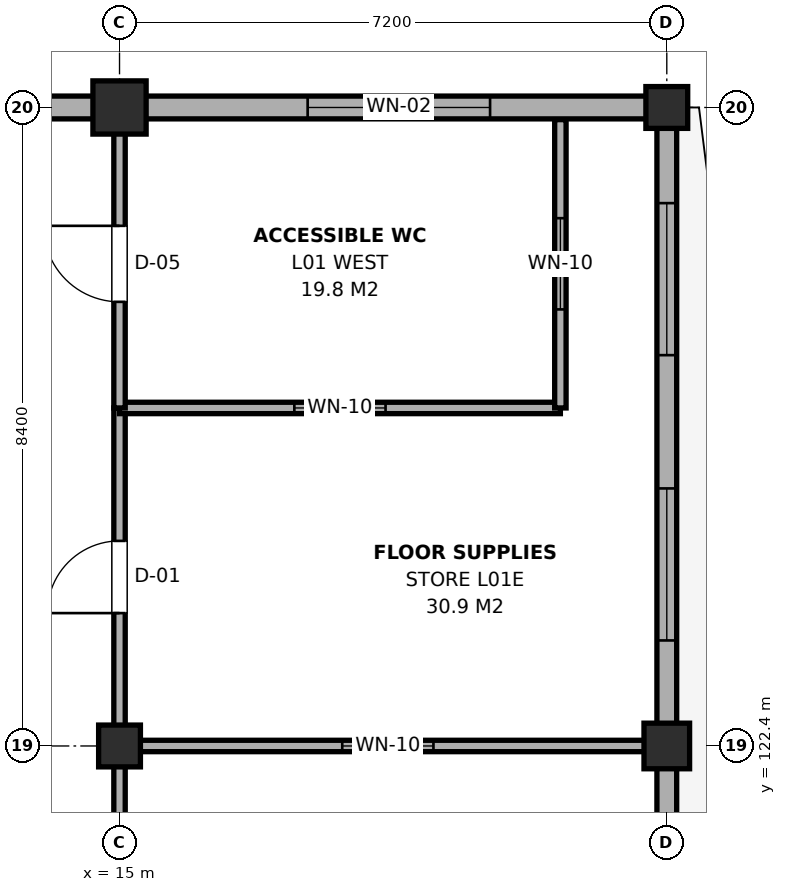
"""IFC4 building model, lengths in metres.
Left out: names, types, materials, properties, quantities, classifications, styles, units other than length and angle.
Written with IfcOpenShell. Run it as: python <this file> out.ifc"""

import sys

from ifc_helpers import new_model, si_unit, direction, frame, frame_2d, origin, origin_2d, place, context, subcontext, project, spatial, rectangle, extrude, element, fill, save


model = new_model("IFC4")
c1 = context("Model", 3, precision=1e-05, world=origin(), true_north=direction((0.0, 1.0)))
c2 = subcontext(c1, "Body", "Model", "MODEL_VIEW")
j1 = project(units=[si_unit("LENGTHUNIT", "METRE"), si_unit("PLANEANGLEUNIT", "RADIAN")], contexts=[c1])
p1 = place(None, origin())
s1 = spatial("IfcSite", under=j1, at=p1, CompositionType="ELEMENT")
p2 = place(p1, origin())
s2 = spatial("IfcBuilding", under=s1, at=p2, CompositionType="ELEMENT")
p3 = place(p2, frame((0.0, 0.0, 4.8)))
s3 = spatial("IfcBuildingStorey", under=s2, at=p3, CompositionType="ELEMENT", Elevation=4.8)
p4 = place(p3, frame((15.0, 122.4, 0.0), z_axis=(0.0, 0.0, 1.0), x_axis=(1.0, 0.0, 0.0)))
e1 = element("IfcColumn", 1, at=p4, inside=s3, PredefinedType="COLUMN", context=c2, shape_type="SweptSolid", body=[
    extrude(rectangle(XDim=0.55, YDim=0.55, at=origin_2d()), origin(), (0.0, 0.0, 1.0), 4.2),
])
p5 = place(p3, frame((15.0, 130.8, 0.0), z_axis=(0.0, 0.0, 1.0), x_axis=(1.0, 0.0, 0.0)))
e2 = element("IfcColumn", 2, at=p5, inside=s3, PredefinedType="COLUMN", context=c2, shape_type="SweptSolid", body=[
    extrude(rectangle(XDim=0.7, YDim=0.7, at=origin_2d()), origin(), (0.0, 0.0, 1.0), 4.2),
])
p6 = place(p3, frame((22.2, 122.4, 0.0), z_axis=(0.0, 0.0, 1.0), x_axis=(1.0, 0.0, 0.0)))
e3 = element("IfcColumn", 3, at=p6, inside=s3, PredefinedType="COLUMN", context=c2, shape_type="SweptSolid", body=[
    extrude(rectangle(XDim=0.6, YDim=0.6, at=origin_2d()), origin(), (0.0, 0.0, 1.0), 4.2),
])
p7 = place(p3, frame((22.2, 130.8, 0.0), z_axis=(0.0, 0.0, 1.0), x_axis=(1.0, 0.0, 0.0)))
e4 = element("IfcColumn", 4, at=p7, inside=s3, PredefinedType="COLUMN", context=c2, shape_type="SweptSolid", body=[
    extrude(rectangle(XDim=0.55, YDim=0.55, at=origin_2d()), origin(), (0.0, 0.0, 1.0), 4.2),
])
p8 = place(p3, frame((22.2, 113.4, 0.0), z_axis=(0.0, 0.0, 1.0), x_axis=(0.0, 1.0, 0.0)))
e5 = element("IfcWall", 5, at=p8, inside=s3, PredefinedType="SOLIDWALL", context=c2, shape_type="SweptSolid", body=[
    extrude(rectangle(XDim=9.0, YDim=0.26, at=frame_2d((4.5, 0.0))), origin(), (0.0, 0.0, 1.0), 3.585),
])
p9 = place(p8, frame((1.52, 0.0, 0.9)))
e6 = element("IfcOpeningElement", 6, at=p9, cuts=e5, PredefinedType="OPENING", context=c2, shape_type="SweptSolid", body=[
    extrude(rectangle(XDim=2.0, YDim=1.8, at=frame_2d((1.0, 0.9))), frame((0.0, 0.145, 0.0), z_axis=(0.0, -1.0, 0.0), x_axis=(1.0, 0.0, 0.0)), (0.0, 0.0, 1.0), 0.29),
])
p10 = place(p8, frame((5.48, 0.0, 0.9)))
e7 = element("IfcOpeningElement", 7, at=p10, cuts=e5, PredefinedType="OPENING", context=c2, shape_type="SweptSolid", body=[
    extrude(rectangle(XDim=2.0, YDim=1.8, at=frame_2d((1.0, 0.9))), frame((0.0, 0.145, 0.0), z_axis=(0.0, -1.0, 0.0), x_axis=(1.0, 0.0, 0.0)), (0.0, 0.0, 1.0), 0.29),
])
p11 = place(p3, frame((22.2, 122.4, 0.0), z_axis=(0.0, 0.0, 1.0), x_axis=(0.0, 1.0, 0.0)))
e8 = element("IfcWall", 8, at=p11, inside=s3, PredefinedType="SOLIDWALL", context=c2, shape_type="SweptSolid", body=[
    extrude(rectangle(XDim=8.53, YDim=0.26, at=frame_2d((4.265, 0.0))), origin(), (0.0, 0.0, 1.0), 3.585),
])
p12 = place(p11, frame((1.388, 0.0, 0.9)))
e9 = element("IfcOpeningElement", 9, at=p12, cuts=e8, PredefinedType="OPENING", context=c2, shape_type="SweptSolid", body=[
    extrude(rectangle(XDim=2.0, YDim=1.8, at=frame_2d((1.0, 0.9))), frame((0.0, 0.145, 0.0), z_axis=(0.0, -1.0, 0.0), x_axis=(1.0, 0.0, 0.0)), (0.0, 0.0, 1.0), 0.29),
])
p13 = place(p11, frame((5.142, 0.0, 0.9)))
e10 = element("IfcOpeningElement", 10, at=p13, cuts=e8, PredefinedType="OPENING", context=c2, shape_type="SweptSolid", body=[
    extrude(rectangle(XDim=2.0, YDim=1.8, at=frame_2d((1.0, 0.9))), frame((0.0, 0.145, 0.0), z_axis=(0.0, -1.0, 0.0), x_axis=(1.0, 0.0, 0.0)), (0.0, 0.0, 1.0), 0.29),
])
p14 = place(p3, frame((7.8, 130.8, 0.0), z_axis=(0.0, 0.0, 1.0), x_axis=(1.0, 0.0, 0.0)))
e11 = element("IfcWall", 11, at=p14, inside=s3, PredefinedType="SOLIDWALL", context=c2, shape_type="SweptSolid", body=[
    extrude(rectangle(XDim=7.2, YDim=0.3, at=frame_2d((3.6, 0.0))), origin(), (0.0, 0.0, 1.0), 3.475),
])
p15 = place(p14, frame((1.45, 0.0, 0.9)))
e12 = element("IfcOpeningElement", 12, at=p15, cuts=e11, PredefinedType="OPENING", context=c2, shape_type="SweptSolid", body=[
    extrude(rectangle(XDim=2.4, YDim=2.1, at=frame_2d((1.2, 1.05))), frame((0.0, 0.165, 0.0), z_axis=(0.0, -1.0, 0.0), x_axis=(1.0, 0.0, 0.0)), (0.0, 0.0, 1.0), 0.33),
])
p16 = place(p3, frame((15.0, 130.8, 0.0), z_axis=(0.0, 0.0, 1.0), x_axis=(1.0, 0.0, 0.0)))
e13 = element("IfcWall", 13, at=p16, inside=s3, PredefinedType="SOLIDWALL", context=c2, shape_type="SweptSolid", body=[
    extrude(rectangle(XDim=7.35, YDim=0.3, at=frame_2d((3.675, 0.0))), origin(), (0.0, 0.0, 1.0), 3.525),
])
p17 = place(p16, frame((2.475, 0.0, 0.9)))
e14 = element("IfcOpeningElement", 14, at=p17, cuts=e13, PredefinedType="OPENING", context=c2, shape_type="SweptSolid", body=[
    extrude(rectangle(XDim=2.4, YDim=2.1, at=frame_2d((1.2, 1.05))), frame((0.0, 0.165, 0.0), z_axis=(0.0, -1.0, 0.0), x_axis=(1.0, 0.0, 0.0)), (0.0, 0.0, 1.0), 0.33),
])
p18 = place(p3, frame((15.0, 104.4, 0.0), z_axis=(0.0, 0.0, 1.0), x_axis=(0.0, 1.0, 0.0)))
e15 = element("IfcWall", 15, at=p18, inside=s3, PredefinedType="PARTITIONING", context=c2, shape_type="SweptSolid", body=[
    extrude(rectangle(XDim=18.0, YDim=0.15, at=frame_2d((9.0, 0.0))), origin(), (0.0, 0.0, 1.0), 3.535),
])
p19 = place(p18, frame((9.375, 0.0, 0.0)))
e16 = element("IfcOpeningElement", 16, at=p19, cuts=e15, PredefinedType="OPENING", context=c2, shape_type="SweptSolid", body=[
    extrude(rectangle(XDim=1.05, YDim=2.15, at=frame_2d((0.525, 1.075))), frame((0.0, 0.09, 0.0), z_axis=(0.0, -1.0, 0.0), x_axis=(1.0, 0.0, 0.0)), (0.0, 0.0, 1.0), 0.18),
])
p20 = place(p18, frame((3.2, 0.0, 0.95)))
e17 = element("IfcOpeningElement", 17, at=p20, cuts=e15, PredefinedType="OPENING", context=c2, shape_type="SweptSolid", body=[
    extrude(rectangle(XDim=2.6, YDim=1.5, at=frame_2d((1.3, 0.75))), frame((0.0, 0.09, 0.0), z_axis=(0.0, -1.0, 0.0), x_axis=(1.0, 0.0, 0.0)), (0.0, 0.0, 1.0), 0.18),
])
p21 = place(p18, frame((12.2, 0.0, 0.95)))
e18 = element("IfcOpeningElement", 18, at=p21, cuts=e15, PredefinedType="OPENING", context=c2, shape_type="SweptSolid", body=[
    extrude(rectangle(XDim=2.6, YDim=1.5, at=frame_2d((1.3, 0.75))), frame((0.0, 0.09, 0.0), z_axis=(0.0, -1.0, 0.0), x_axis=(1.0, 0.0, 0.0)), (0.0, 0.0, 1.0), 0.18),
])
p22 = place(p3, frame((15.0, 122.4, 0.0), z_axis=(0.0, 0.0, 1.0), x_axis=(0.0, 1.0, 0.0)))
e19 = element("IfcWall", 19, at=p22, inside=s3, PredefinedType="PARTITIONING", context=c2, shape_type="SweptSolid", body=[
    extrude(rectangle(XDim=4.447, YDim=0.15, at=frame_2d((2.224, 0.0))), origin(), (0.0, 0.0, 1.0), 3.585),
])
p23 = place(p22, frame((1.748, 0.0, 0.0)))
e20 = element("IfcOpeningElement", 20, at=p23, cuts=e19, PredefinedType="OPENING", context=c2, shape_type="SweptSolid", body=[
    extrude(rectangle(XDim=0.95, YDim=2.15, at=frame_2d((0.475, 1.075))), frame((0.0, 0.09, 0.0), z_axis=(0.0, -1.0, 0.0), x_axis=(1.0, 0.0, 0.0)), (0.0, 0.0, 1.0), 0.18),
])
p24 = place(p3, frame((15.0, 126.847, 0.0), z_axis=(0.0, 0.0, 1.0), x_axis=(1.0, 0.0, 0.0)))
e21 = element("IfcWall", 21, at=p24, inside=s3, PredefinedType="PARTITIONING", context=c2, shape_type="SweptSolid", body=[
    extrude(rectangle(XDim=5.8, YDim=0.15, at=frame_2d((2.9, 0.0))), origin(), (0.0, 0.0, 1.0), 3.625),
])
p25 = place(p24, frame((2.3, 0.0, 0.95)))
e22 = element("IfcOpeningElement", 22, at=p25, cuts=e21, PredefinedType="OPENING", context=c2, shape_type="SweptSolid", body=[
    extrude(rectangle(XDim=1.2, YDim=1.5, at=frame_2d((0.6, 0.75))), frame((0.0, 0.09, 0.0), z_axis=(0.0, -1.0, 0.0), x_axis=(1.0, 0.0, 0.0)), (0.0, 0.0, 1.0), 0.18),
])
p26 = place(p3, frame((20.8, 126.847, 0.0), z_axis=(0.0, 0.0, 1.0), x_axis=(0.0, 1.0, 0.0)))
e23 = element("IfcWall", 23, at=p26, inside=s3, PredefinedType="PARTITIONING", context=c2, shape_type="SweptSolid", body=[
    extrude(rectangle(XDim=3.793, YDim=0.15, at=frame_2d((1.896, 0.0))), origin(), (0.0, 0.0, 1.0), 3.525),
])
p27 = place(p26, frame((1.296, 0.0, 0.95)))
e24 = element("IfcOpeningElement", 24, at=p27, cuts=e23, PredefinedType="OPENING", context=c2, shape_type="SweptSolid", body=[
    extrude(rectangle(XDim=1.2, YDim=1.5, at=frame_2d((0.6, 0.75))), frame((0.0, 0.09, 0.0), z_axis=(0.0, -1.0, 0.0), x_axis=(1.0, 0.0, 0.0)), (0.0, 0.0, 1.0), 0.18),
])
p28 = place(p3, frame((15.0, 126.847, 0.0), z_axis=(0.0, 0.0, 1.0), x_axis=(0.0, 1.0, 0.0)))
e25 = element("IfcWall", 25, at=p28, inside=s3, PredefinedType="PARTITIONING", context=c2, shape_type="SweptSolid", body=[
    extrude(rectangle(XDim=3.793, YDim=0.15, at=frame_2d((1.896, 0.0))), origin(), (0.0, 0.0, 1.0), 3.625),
])
p29 = place(p28, frame((1.396, 0.0, 0.0)))
e26 = element("IfcOpeningElement", 26, at=p29, cuts=e25, PredefinedType="OPENING", context=c2, shape_type="SweptSolid", body=[
    extrude(rectangle(XDim=1.0, YDim=2.15, at=frame_2d((0.5, 1.075))), frame((0.0, 0.09, 0.0), z_axis=(0.0, -1.0, 0.0), x_axis=(1.0, 0.0, 0.0)), (0.0, 0.0, 1.0), 0.18),
])
p30 = place(p3, frame((15.0, 122.4, 0.0), z_axis=(0.0, 0.0, 1.0), x_axis=(1.0, 0.0, 0.0)))
e27 = element("IfcWall", 27, at=p30, inside=s3, PredefinedType="PARTITIONING", context=c2, shape_type="SweptSolid", body=[
    extrude(rectangle(XDim=7.06, YDim=0.15, at=frame_2d((3.53, 0.0))), origin(), (0.0, 0.0, 1.0), 3.425),
])
p31 = place(p30, frame((2.93, 0.0, 0.95)))
e28 = element("IfcOpeningElement", 28, at=p31, cuts=e27, PredefinedType="OPENING", context=c2, shape_type="SweptSolid", body=[
    extrude(rectangle(XDim=1.2, YDim=1.5, at=frame_2d((0.6, 0.75))), frame((0.0, 0.09, 0.0), z_axis=(0.0, -1.0, 0.0), x_axis=(1.0, 0.0, 0.0)), (0.0, 0.0, 1.0), 0.18),
])
p32 = place(p12, origin())
e29 = element("IfcWindow", 29, at=p32, inside=s3, PartitioningType="SINGLE_PANEL", PredefinedType="WINDOW", context=c2, shape_type="SweptSolid", body=[
    extrude(rectangle(XDim=2.0, YDim=1.8, at=frame_2d((1.0, 0.9))), frame((0.0, 0.03, 0.0), z_axis=(0.0, -1.0, 0.0), x_axis=(1.0, 0.0, 0.0)), (0.0, 0.0, 1.0), 0.06),
])
fill(e9, e29)
p33 = place(p13, origin())
e30 = element("IfcWindow", 30, at=p33, inside=s3, PartitioningType="SINGLE_PANEL", PredefinedType="WINDOW", context=c2, shape_type="SweptSolid", body=[
    extrude(rectangle(XDim=2.0, YDim=1.8, at=frame_2d((1.0, 0.9))), frame((0.0, 0.03, 0.0), z_axis=(0.0, -1.0, 0.0), x_axis=(1.0, 0.0, 0.0)), (0.0, 0.0, 1.0), 0.06),
])
fill(e10, e30)
p34 = place(p17, origin())
e31 = element("IfcWindow", 31, at=p34, inside=s3, PartitioningType="SINGLE_PANEL", PredefinedType="WINDOW", context=c2, shape_type="SweptSolid", body=[
    extrude(rectangle(XDim=2.4, YDim=2.1, at=frame_2d((1.2, 1.05))), frame((0.0, 0.03, 0.0), z_axis=(0.0, -1.0, 0.0), x_axis=(1.0, 0.0, 0.0)), (0.0, 0.0, 1.0), 0.06),
])
fill(e14, e31)
p35 = place(p23, origin())
e32 = element("IfcDoor", 32, at=p35, inside=s3, OperationType="SINGLE_SWING_LEFT", PredefinedType="DOOR", context=c2, shape_type="SweptSolid", body=[
    extrude(rectangle(XDim=0.95, YDim=2.15, at=frame_2d((0.475, 1.075))), frame((0.0, 0.025, 0.0), z_axis=(0.0, -1.0, 0.0), x_axis=(1.0, 0.0, 0.0)), (0.0, 0.0, 1.0), 0.05),
])
fill(e20, e32)
p36 = place(p25, origin())
e33 = element("IfcWindow", 33, at=p36, inside=s3, PartitioningType="SINGLE_PANEL", PredefinedType="WINDOW", context=c2, shape_type="SweptSolid", body=[
    extrude(rectangle(XDim=1.2, YDim=1.5, at=frame_2d((0.6, 0.75))), frame((0.0, 0.03, 0.0), z_axis=(0.0, -1.0, 0.0), x_axis=(1.0, 0.0, 0.0)), (0.0, 0.0, 1.0), 0.06),
])
fill(e22, e33)
p37 = place(p27, origin())
e34 = element("IfcWindow", 34, at=p37, inside=s3, PartitioningType="SINGLE_PANEL", PredefinedType="WINDOW", context=c2, shape_type="SweptSolid", body=[
    extrude(rectangle(XDim=1.2, YDim=1.5, at=frame_2d((0.6, 0.75))), frame((0.0, 0.03, 0.0), z_axis=(0.0, -1.0, 0.0), x_axis=(1.0, 0.0, 0.0)), (0.0, 0.0, 1.0), 0.06),
])
fill(e24, e34)
p38 = place(p29, origin())
e35 = element("IfcDoor", 35, at=p38, inside=s3, OperationType="SINGLE_SWING_RIGHT", PredefinedType="DOOR", context=c2, shape_type="SweptSolid", body=[
    extrude(rectangle(XDim=1.0, YDim=2.15, at=frame_2d((0.5, 1.075))), frame((0.0, 0.025, 0.0), z_axis=(0.0, -1.0, 0.0), x_axis=(1.0, 0.0, 0.0)), (0.0, 0.0, 1.0), 0.05),
])
fill(e26, e35)
p39 = place(p31, origin())
e36 = element("IfcWindow", 36, at=p39, inside=s3, PartitioningType="SINGLE_PANEL", PredefinedType="WINDOW", context=c2, shape_type="SweptSolid", body=[
    extrude(rectangle(XDim=1.2, YDim=1.5, at=frame_2d((0.6, 0.75))), frame((0.0, 0.03, 0.0), z_axis=(0.0, -1.0, 0.0), x_axis=(1.0, 0.0, 0.0)), (0.0, 0.0, 1.0), 0.06),
])
fill(e28, e36)
save(model, sys.argv[1])
